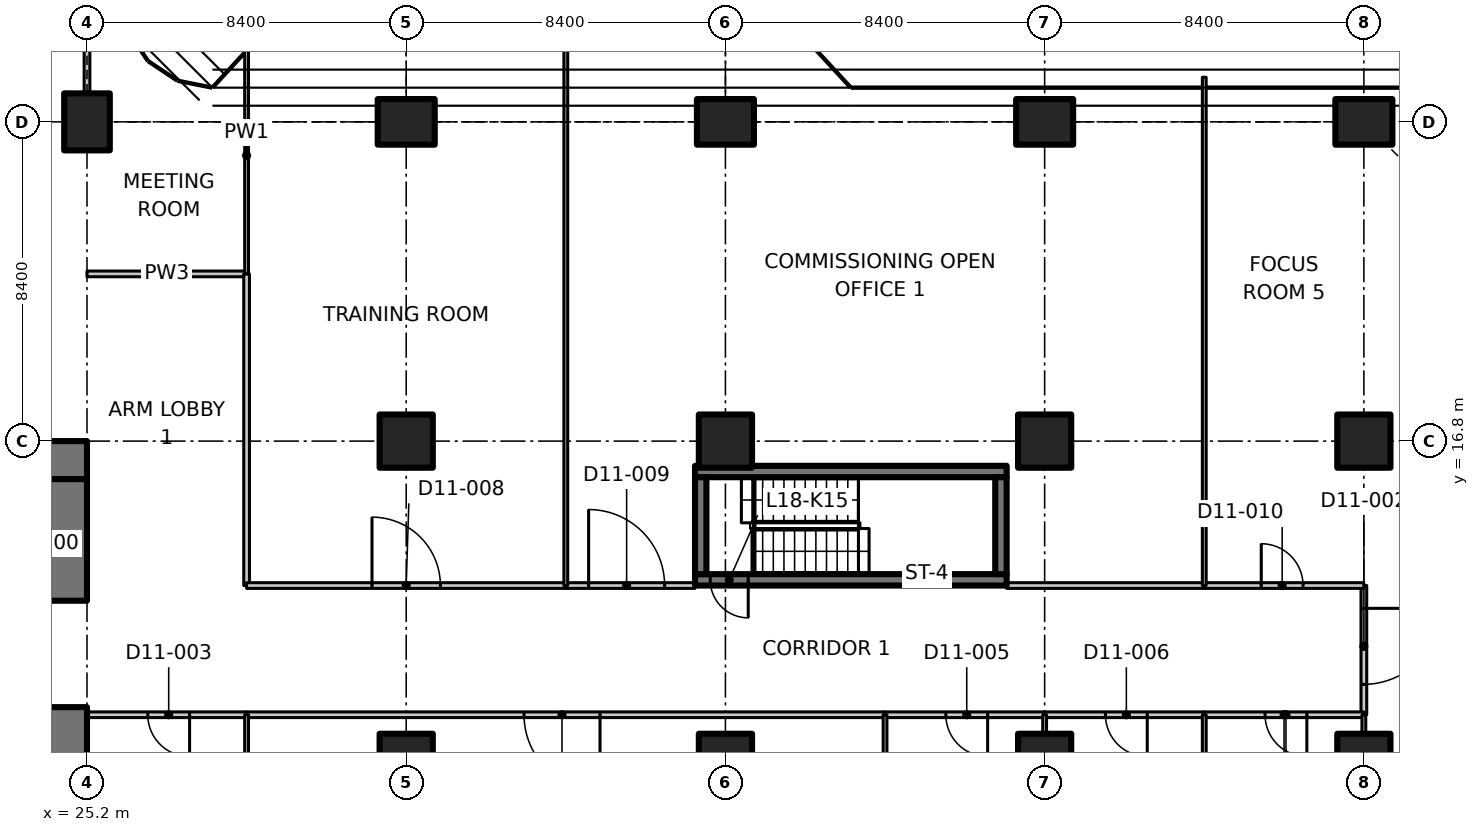
"""IFC4 building model, lengths in metres.
Left out: names, types, materials, properties, quantities, classifications, styles, units other than length and angle.
Written with IfcOpenShell. Run it as: python <this file> out.ifc"""

import sys

from ifc_helpers import new_model, si_unit, direction, frame, frame_2d, origin, origin_2d, place, context, subcontext, project, spatial, polyline, rectangle, outline, extrude, element, fill, save


model = new_model("IFC4")
c1 = context("Model", 3, precision=1e-05, world=origin(), true_north=direction((0.0, 1.0)))
c2 = subcontext(c1, "Body", "Model", "MODEL_VIEW")
j1 = project(units=[si_unit("LENGTHUNIT", "METRE"), si_unit("PLANEANGLEUNIT", "RADIAN")], contexts=[c1])
p1 = place(None, origin())
s1 = spatial("IfcSite", under=j1, at=p1, CompositionType="ELEMENT")
p2 = place(p1, origin())
s2 = spatial("IfcBuilding", under=s1, at=p2, CompositionType="ELEMENT")
p3 = place(p2, frame((0.0, 0.0, 79.7)))
s3 = spatial("IfcBuildingStorey", under=s2, at=p3, CompositionType="ELEMENT", Elevation=79.7)
p4 = place(p3, frame((25.2, 25.2, 0.0), z_axis=(0.0, 0.0, 1.0), x_axis=(1.0, 0.0, 0.0)))
e1 = element("IfcColumn", 1, at=p4, inside=s3, PredefinedType="COLUMN", context=c2, shape_type="SweptSolid", body=[
    extrude(rectangle(XDim=1.2, YDim=1.5, at=origin_2d()), origin(), (0.0, 0.0, 1.0), 3.35),
])
for number, where, z_axis, x_axis in (
    (2, (33.6, 8.4, 0.0), (0.0, 0.0, 1.0), (1.0, 0.0, 0.0)),
    (3, (33.6, 16.8, 0.0), (0.0, 0.0, 1.0), (1.0, 0.0, 0.0)),
):
    element("IfcColumn", number, at=place(p3, frame(where, z_axis=z_axis, x_axis=x_axis)), inside=s3, PredefinedType="COLUMN", context=c2, shape_type="SweptSolid", body=[
        extrude(rectangle(XDim=1.4, YDim=1.4, at=origin_2d()), origin(), (0.0, 0.0, 1.0), 3.35),
    ])
p5 = place(p3, frame((33.6, 25.2, 0.0), z_axis=(0.0, 0.0, 1.0), x_axis=(0.0, 1.0, 0.0)))
e4 = element("IfcColumn", 4, at=p5, inside=s3, PredefinedType="COLUMN", context=c2, shape_type="SweptSolid", body=[
    extrude(rectangle(XDim=1.2, YDim=1.5, at=origin_2d()), origin(), (0.0, 0.0, 1.0), 3.35),
])
for number, where, z_axis, x_axis in (
    (5, (42.0, 8.4, 0.0), (0.0, 0.0, 1.0), (1.0, 0.0, 0.0)),
    (6, (42.0, 16.8, 0.0), (0.0, 0.0, 1.0), (1.0, 0.0, 0.0)),
):
    element("IfcColumn", number, at=place(p3, frame(where, z_axis=z_axis, x_axis=x_axis)), inside=s3, PredefinedType="COLUMN", context=c2, shape_type="SweptSolid", body=[
        extrude(rectangle(XDim=1.4, YDim=1.4, at=origin_2d()), origin(), (0.0, 0.0, 1.0), 3.35),
    ])
p6 = place(p3, frame((42.0, 25.2, 0.0), z_axis=(0.0, 0.0, 1.0), x_axis=(0.0, 1.0, 0.0)))
e7 = element("IfcColumn", 7, at=p6, inside=s3, PredefinedType="COLUMN", context=c2, shape_type="SweptSolid", body=[
    extrude(rectangle(XDim=1.2, YDim=1.5, at=origin_2d()), origin(), (0.0, 0.0, 1.0), 3.35),
])
for number, where, z_axis, x_axis in (
    (8, (50.4, 8.4, 0.0), (0.0, 0.0, 1.0), (1.0, 0.0, 0.0)),
    (9, (50.4, 16.8, 0.0), (0.0, 0.0, 1.0), (1.0, 0.0, 0.0)),
):
    element("IfcColumn", number, at=place(p3, frame(where, z_axis=z_axis, x_axis=x_axis)), inside=s3, PredefinedType="COLUMN", context=c2, shape_type="SweptSolid", body=[
        extrude(rectangle(XDim=1.4, YDim=1.4, at=origin_2d()), origin(), (0.0, 0.0, 1.0), 3.35),
    ])
p7 = place(p3, frame((50.4, 25.2, 0.0), z_axis=(0.0, 0.0, 1.0), x_axis=(0.0, 1.0, 0.0)))
e10 = element("IfcColumn", 10, at=p7, inside=s3, PredefinedType="COLUMN", context=c2, shape_type="SweptSolid", body=[
    extrude(rectangle(XDim=1.2, YDim=1.5, at=origin_2d()), origin(), (0.0, 0.0, 1.0), 3.35),
])
for number, where, z_axis, x_axis in (
    (11, (58.8, 8.4, 0.0), (0.0, 0.0, 1.0), (1.0, 0.0, 0.0)),
    (12, (58.8, 16.8, 0.0), (0.0, 0.0, 1.0), (1.0, 0.0, 0.0)),
):
    element("IfcColumn", number, at=place(p3, frame(where, z_axis=z_axis, x_axis=x_axis)), inside=s3, PredefinedType="COLUMN", context=c2, shape_type="SweptSolid", body=[
        extrude(rectangle(XDim=1.4, YDim=1.4, at=origin_2d()), origin(), (0.0, 0.0, 1.0), 3.35),
    ])
p8 = place(p3, frame((58.8, 25.2, 0.0), z_axis=(0.0, 0.0, 1.0), x_axis=(0.0, 1.0, 0.0)))
e13 = element("IfcColumn", 13, at=p8, inside=s3, PredefinedType="COLUMN", context=c2, shape_type="SweptSolid", body=[
    extrude(rectangle(XDim=1.2, YDim=1.5, at=origin_2d()), origin(), (0.0, 0.0, 1.0), 3.35),
])
p9 = place(p3, frame((23.8, 16.3, 0.0), z_axis=(0.0, 0.0, 1.0), x_axis=(1.0, 0.0, 0.0)))
e14 = element("IfcWall", 14, at=p9, inside=s3, PredefinedType="SHEAR", context=c2, shape_type="SweptSolid", body=[
    extrude(rectangle(XDim=1.4, YDim=1.0, at=frame_2d((0.7, 0.0))), origin(), (0.0, 0.0, 1.0), 3.35),
])
p10 = place(p3, frame((24.7, 1.0, 0.0), z_axis=(0.0, 0.0, 1.0), x_axis=(0.0, 1.0, 0.0)))
e15 = element("IfcWall", 15, at=p10, inside=s3, PredefinedType="SHEAR", context=c2, shape_type="SweptSolid", body=[
    extrude(rectangle(XDim=8.8, YDim=1.0, at=frame_2d((4.4, 0.0))), origin(), (0.0, 0.0, 1.0), 3.35),
])
p11 = place(p3, frame((24.7, 12.6, 0.0), z_axis=(0.0, 0.0, 1.0), x_axis=(0.0, 1.0, 0.0)))
e16 = element("IfcWall", 16, at=p11, inside=s3, PredefinedType="SHEAR", context=c2, shape_type="SweptSolid", body=[
    extrude(rectangle(XDim=3.2, YDim=1.0, at=frame_2d((1.6, 0.0))), origin(), (0.0, 0.0, 1.0), 3.35),
])
p12 = place(p3, frame((49.4, 13.15, 0.0), z_axis=(0.0, 0.0, 1.0), x_axis=(-1.0, 0.0, 0.0)))
e17 = element("IfcWall", 17, at=p12, inside=s3, PredefinedType="SHEAR", context=c2, shape_type="SweptSolid", body=[
    extrude(rectangle(XDim=8.2, YDim=0.3, at=frame_2d((4.1, 0.0))), origin(), (0.0, 0.0, 1.0), 3.35),
])
p13 = place(p12, frame((6.8, 0.0, 0.0)))
e18 = element("IfcOpeningElement", 18, at=p13, cuts=e17, PredefinedType="OPENING", context=c2, shape_type="SweptSolid", body=[
    extrude(rectangle(XDim=1.0, YDim=2.1, at=frame_2d((0.5, 1.05))), frame((0.0, 0.16, 0.0), z_axis=(0.0, -1.0, 0.0), x_axis=(1.0, 0.0, 0.0)), (0.0, 0.0, 1.0), 0.32),
])
p14 = place(p3, frame((41.2, 16.0, 0.0), z_axis=(0.0, 0.0, 1.0), x_axis=(1.0, 0.0, 0.0)))
e19 = element("IfcWall", 19, at=p14, inside=s3, PredefinedType="SHEAR", context=c2, shape_type="SweptSolid", body=[
    extrude(rectangle(XDim=8.2, YDim=0.3, at=frame_2d((4.1, 0.0))), origin(), (0.0, 0.0, 1.0), 3.35),
])
for number, where, z_axis, x_axis in (
    (20, (41.35, 13.3, 0.0), (0.0, 0.0, 1.0), (0.0, 1.0, 0.0)),
    (21, (49.25, 13.3, 0.0), (0.0, 0.0, 1.0), (0.0, 1.0, 0.0)),
):
    element("IfcWall", number, at=place(p3, frame(where, z_axis=z_axis, x_axis=x_axis)), inside=s3, PredefinedType="SHEAR", context=c2, shape_type="SweptSolid", body=[
        extrude(rectangle(XDim=2.55, YDim=0.3, at=frame_2d((1.275, 0.0))), origin(), (0.0, 0.0, 1.0), 3.35),
    ])
p15 = place(p3, frame((25.2, 21.2, 0.0), z_axis=(0.0, 0.0, 1.0), x_axis=(1.0, 0.0, 0.0)))
e22 = element("IfcWall", 22, at=p15, inside=s3, PredefinedType="PARTITIONING", context=c2, shape_type="SweptSolid", body=[
    extrude(rectangle(XDim=4.2, YDim=0.15, at=frame_2d((2.1, 0.0))), origin(), (0.0, 0.0, 1.0), 3.33),
])
p16 = place(p3, frame((29.4, 9.6, 0.0), z_axis=(0.0, 0.0, 1.0), x_axis=(-1.0, 0.0, 0.0)))
e23 = element("IfcWall", 23, at=p16, inside=s3, PredefinedType="PARTITIONING", context=c2, shape_type="SweptSolid", body=[
    extrude(rectangle(XDim=4.2, YDim=0.15, at=frame_2d((2.1, 0.0))), origin(), (0.0, 0.0, 1.0), 3.33),
])
p17 = place(p16, frame((1.5, 0.0, 0.0)))
e24 = element("IfcOpeningElement", 24, at=p17, cuts=e23, PredefinedType="OPENING", context=c2, shape_type="SweptSolid", body=[
    extrude(rectangle(XDim=1.1, YDim=2.1, at=frame_2d((0.55, 1.05))), frame((0.0, 0.085, 0.0), z_axis=(0.0, -1.0, 0.0), x_axis=(1.0, 0.0, 0.0)), (0.0, 0.0, 1.0), 0.17),
])
p18 = place(p3, frame((29.4, 21.2, 0.0), z_axis=(0.0, 0.0, 1.0), x_axis=(0.0, -1.0, 0.0)))
e25 = element("IfcWall", 25, at=p18, inside=s3, PredefinedType="PARTITIONING", context=c2, shape_type="SweptSolid", body=[
    extrude(rectangle(XDim=8.2, YDim=0.15, at=frame_2d((4.1, 0.0))), origin(), (0.0, 0.0, 1.0), 3.33),
])
p19 = place(p3, frame((29.4, 27.429, 0.0), z_axis=(0.0, 0.0, 1.0), x_axis=(0.0, -1.0, 0.0)))
e26 = element("IfcWall", 26, at=p19, inside=s3, PredefinedType="PARTITIONING", context=c2, shape_type="SweptSolid", body=[
    extrude(outline(polyline([(0.0, 0.0), (6.229, 0.0), (6.229, 3.33), (2.679, 3.33), (2.677, 2.98), (1.781, 2.98), (1.779, 3.33), (0.154, 3.33), (0.0, 3.33), (0.0, 0.0)])), frame((0.0, 0.05, 0.0), z_axis=(0.0, -1.0, 0.0), x_axis=(1.0, 0.0, 0.0)), (0.0, 0.0, 1.0), 0.1),
])
p20 = place(p3, frame((25.2, 31.0, 0.0), z_axis=(0.0, 0.0, 1.0), x_axis=(0.0, -1.0, 0.0)))
e27 = element("IfcWall", 27, at=p20, inside=s3, PredefinedType="PARTITIONING", context=c2, shape_type="SweptSolid", body=[
    extrude(outline(polyline([(0.0, 0.0), (5.03, 0.0), (5.03, 2.98), (0.0, 2.98), (0.0, 0.0)])), frame((0.0, 0.075, 0.0), z_axis=(0.0, -1.0, 0.0), x_axis=(1.0, 0.0, 0.0)), (0.0, 0.0, 1.0), 0.15),
])
p21 = place(p20, frame((1.83, 0.0, 0.0)))
e28 = element("IfcOpeningElement", 28, at=p21, cuts=e27, PredefinedType="OPENING", context=c2, shape_type="SweptSolid", body=[
    extrude(rectangle(XDim=1.1, YDim=2.1, at=frame_2d((0.55, 1.05))), frame((0.0, 0.085, 0.0), z_axis=(0.0, -1.0, 0.0), x_axis=(1.0, 0.0, 0.0)), (0.0, 0.0, 1.0), 0.17),
])
p22 = place(p3, frame((58.8, 13.0, 0.0), z_axis=(0.0, 0.0, 1.0), x_axis=(0.0, -1.0, 0.0)))
e29 = element("IfcWall", 29, at=p22, inside=s3, PredefinedType="PARTITIONING", context=c2, shape_type="SweptSolid", body=[
    extrude(rectangle(XDim=3.4, YDim=0.15, at=frame_2d((1.7, 0.0))), origin(), (0.0, 0.0, 1.0), 3.33),
])
p23 = place(p22, frame((0.6, 0.0, 0.0)))
e30 = element("IfcOpeningElement", 30, at=p23, cuts=e29, PredefinedType="OPENING", context=c2, shape_type="SweptSolid", body=[
    extrude(rectangle(XDim=2.0, YDim=2.4, at=frame_2d((1.0, 1.2))), frame((0.0, 0.085, 0.0), z_axis=(0.0, -1.0, 0.0), x_axis=(1.0, 0.0, 0.0)), (0.0, 0.0, 1.0), 0.17),
])
p24 = place(p3, frame((46.2, 9.6, 0.0), z_axis=(0.0, 0.0, 1.0), x_axis=(-1.0, 0.0, 0.0)))
e31 = element("IfcWall", 31, at=p24, inside=s3, PredefinedType="PARTITIONING", context=c2, shape_type="SweptSolid", body=[
    extrude(rectangle(XDim=16.8, YDim=0.15, at=frame_2d((8.4, 0.0))), origin(), (0.0, 0.0, 1.0), 3.33),
])
p25 = place(p24, frame((7.5, 0.0, 0.0)))
e32 = element("IfcOpeningElement", 32, at=p25, cuts=e31, PredefinedType="OPENING", context=c2, shape_type="SweptSolid", body=[
    extrude(rectangle(XDim=2.0, YDim=2.4, at=frame_2d((1.0, 1.2))), frame((0.0, 0.085, 0.0), z_axis=(0.0, -1.0, 0.0), x_axis=(1.0, 0.0, 0.0)), (0.0, 0.0, 1.0), 0.17),
])
p26 = place(p3, frame((50.4, 9.6, 0.0), z_axis=(0.0, 0.0, 1.0), x_axis=(-1.0, 0.0, 0.0)))
e33 = element("IfcWall", 33, at=p26, inside=s3, PredefinedType="PARTITIONING", context=c2, shape_type="SweptSolid", body=[
    extrude(rectangle(XDim=4.2, YDim=0.15, at=frame_2d((2.1, 0.0))), origin(), (0.0, 0.0, 1.0), 3.33),
])
p27 = place(p26, frame((1.5, 0.0, 0.0)))
e34 = element("IfcOpeningElement", 34, at=p27, cuts=e33, PredefinedType="OPENING", context=c2, shape_type="SweptSolid", body=[
    extrude(rectangle(XDim=1.1, YDim=2.1, at=frame_2d((0.55, 1.05))), frame((0.0, 0.085, 0.0), z_axis=(0.0, -1.0, 0.0), x_axis=(1.0, 0.0, 0.0)), (0.0, 0.0, 1.0), 0.17),
])
p28 = place(p3, frame((54.6, 9.6, 0.0), z_axis=(0.0, 0.0, 1.0), x_axis=(-1.0, 0.0, 0.0)))
e35 = element("IfcWall", 35, at=p28, inside=s3, PredefinedType="PARTITIONING", context=c2, shape_type="SweptSolid", body=[
    extrude(rectangle(XDim=4.2, YDim=0.15, at=frame_2d((2.1, 0.0))), origin(), (0.0, 0.0, 1.0), 3.33),
])
p29 = place(p28, frame((1.5, 0.0, 0.0)))
e36 = element("IfcOpeningElement", 36, at=p29, cuts=e35, PredefinedType="OPENING", context=c2, shape_type="SweptSolid", body=[
    extrude(rectangle(XDim=1.1, YDim=2.1, at=frame_2d((0.55, 1.05))), frame((0.0, 0.085, 0.0), z_axis=(0.0, -1.0, 0.0), x_axis=(1.0, 0.0, 0.0)), (0.0, 0.0, 1.0), 0.17),
])
p30 = place(p3, frame((58.8, 9.6, 0.0), z_axis=(0.0, 0.0, 1.0), x_axis=(-1.0, 0.0, 0.0)))
e37 = element("IfcWall", 37, at=p30, inside=s3, PredefinedType="PARTITIONING", context=c2, shape_type="SweptSolid", body=[
    extrude(rectangle(XDim=4.2, YDim=0.15, at=frame_2d((2.1, 0.0))), origin(), (0.0, 0.0, 1.0), 3.33),
])
p31 = place(p30, frame((1.5, 0.0, 0.0)))
e38 = element("IfcOpeningElement", 38, at=p31, cuts=e37, PredefinedType="OPENING", context=c2, shape_type="SweptSolid", body=[
    extrude(rectangle(XDim=1.1, YDim=2.1, at=frame_2d((0.55, 1.05))), frame((0.0, 0.085, 0.0), z_axis=(0.0, -1.0, 0.0), x_axis=(1.0, 0.0, 0.0)), (0.0, 0.0, 1.0), 0.17),
])
p32 = place(p3, frame((29.4, 13.0, 0.0), z_axis=(0.0, 0.0, 1.0), x_axis=(1.0, 0.0, 0.0)))
e39 = element("IfcWall", 39, at=p32, inside=s3, PredefinedType="PARTITIONING", context=c2, shape_type="SweptSolid", body=[
    extrude(rectangle(XDim=8.4, YDim=0.15, at=frame_2d((4.2, 0.0))), origin(), (0.0, 0.0, 1.0), 3.33),
])
p33 = place(p32, frame((3.3, 0.0, 0.0)))
e40 = element("IfcOpeningElement", 40, at=p33, cuts=e39, PredefinedType="OPENING", context=c2, shape_type="SweptSolid", body=[
    extrude(rectangle(XDim=1.8, YDim=2.1, at=frame_2d((0.9, 1.05))), frame((0.0, 0.085, 0.0), z_axis=(0.0, -1.0, 0.0), x_axis=(1.0, 0.0, 0.0)), (0.0, 0.0, 1.0), 0.17),
])
p34 = place(p3, frame((37.8, 13.0, 0.0), z_axis=(0.0, 0.0, 1.0), x_axis=(1.0, 0.0, 0.0)))
e41 = element("IfcWall", 41, at=p34, inside=s3, PredefinedType="PARTITIONING", context=c2, shape_type="SweptSolid", body=[
    extrude(rectangle(XDim=3.4, YDim=0.15, at=frame_2d((1.7, 0.0))), origin(), (0.0, 0.0, 1.0), 3.33),
])
p35 = place(p34, frame((0.6, 0.0, 0.0)))
e42 = element("IfcOpeningElement", 42, at=p35, cuts=e41, PredefinedType="OPENING", context=c2, shape_type="SweptSolid", body=[
    extrude(rectangle(XDim=2.0, YDim=2.4, at=frame_2d((1.0, 1.2))), frame((0.0, 0.085, 0.0), z_axis=(0.0, -1.0, 0.0), x_axis=(1.0, 0.0, 0.0)), (0.0, 0.0, 1.0), 0.17),
])
p36 = place(p3, frame((49.4, 13.0, 0.0), z_axis=(0.0, 0.0, 1.0), x_axis=(1.0, 0.0, 0.0)))
e43 = element("IfcWall", 43, at=p36, inside=s3, PredefinedType="PARTITIONING", context=c2, shape_type="SweptSolid", body=[
    extrude(rectangle(XDim=5.2, YDim=0.15, at=frame_2d((2.6, 0.0))), origin(), (0.0, 0.0, 1.0), 3.33),
])
p37 = place(p3, frame((54.6, 13.0, 0.0), z_axis=(0.0, 0.0, 1.0), x_axis=(1.0, 0.0, 0.0)))
e44 = element("IfcWall", 44, at=p37, inside=s3, PredefinedType="PARTITIONING", context=c2, shape_type="SweptSolid", body=[
    extrude(rectangle(XDim=4.2, YDim=0.15, at=frame_2d((2.1, 0.0))), origin(), (0.0, 0.0, 1.0), 3.33),
])
p38 = place(p37, frame((1.5, 0.0, 0.0)))
e45 = element("IfcOpeningElement", 45, at=p38, cuts=e44, PredefinedType="OPENING", context=c2, shape_type="SweptSolid", body=[
    extrude(rectangle(XDim=1.1, YDim=2.1, at=frame_2d((0.55, 1.05))), frame((0.0, 0.085, 0.0), z_axis=(0.0, -1.0, 0.0), x_axis=(1.0, 0.0, 0.0)), (0.0, 0.0, 1.0), 0.17),
])
p39 = place(p3, frame((58.8, 9.12, 0.0), z_axis=(0.0, 0.0, 1.0), x_axis=(0.0, 1.0, 0.0)))
e46 = element("IfcWall", 46, at=p39, inside=s3, PredefinedType="PARTITIONING", context=c2, shape_type="SweptSolid", body=[
    extrude(rectangle(XDim=0.48, YDim=0.1, at=frame_2d((0.24, 0.0))), origin(), (0.0, 0.0, 1.0), 3.33),
])
for number, where, z_axis, x_axis in (
    (47, (29.4, 9.6, 0.0), (0.0, 0.0, 1.0), (0.0, -1.0, 0.0)),
    (48, (46.2, 9.6, 0.0), (0.0, 0.0, 1.0), (0.0, -1.0, 0.0)),
):
    element("IfcWall", number, at=place(p3, frame(where, z_axis=z_axis, x_axis=x_axis)), inside=s3, PredefinedType="PARTITIONING", context=c2, shape_type="SweptSolid", body=[
        extrude(outline(polyline([(0.0, 0.0), (10.965, 0.0), (10.965, 3.33), (10.7, 3.33), (10.05, 3.33), (10.048, 2.98), (9.152, 2.98), (9.15, 3.33), (0.0, 3.33), (0.0, 0.0)])), frame((0.0, 0.05, 0.0), z_axis=(0.0, -1.0, 0.0), x_axis=(1.0, 0.0, 0.0)), (0.0, 0.0, 1.0), 0.1),
    ])
p40 = place(p3, frame((50.4, 9.6, 0.0), z_axis=(0.0, 0.0, 1.0), x_axis=(0.0, -1.0, 0.0)))
e49 = element("IfcWall", 49, at=p40, inside=s3, PredefinedType="PARTITIONING", context=c2, shape_type="SweptSolid", body=[
    extrude(rectangle(XDim=0.48, YDim=0.1, at=frame_2d((0.24, 0.0))), origin(), (0.0, 0.0, 1.0), 3.33),
])
p41 = place(p3, frame((54.6, 9.6, 0.0), z_axis=(0.0, 0.0, 1.0), x_axis=(0.0, -1.0, 0.0)))
e50 = element("IfcWall", 50, at=p41, inside=s3, PredefinedType="PARTITIONING", context=c2, shape_type="SweptSolid", body=[
    extrude(outline(polyline([(0.0, 0.0), (10.965, 0.0), (10.965, 3.33), (10.7, 3.33), (10.05, 3.33), (10.048, 2.98), (9.152, 2.98), (9.15, 3.33), (0.0, 3.33), (0.0, 0.0)])), frame((0.0, 0.05, 0.0), z_axis=(0.0, -1.0, 0.0), x_axis=(1.0, 0.0, 0.0)), (0.0, 0.0, 1.0), 0.1),
])
p42 = place(p3, frame((37.8, 30.243, 0.0), z_axis=(0.0, 0.0, 1.0), x_axis=(0.0, -1.0, 0.0)))
e51 = element("IfcWall", 51, at=p42, inside=s3, PredefinedType="PARTITIONING", context=c2, shape_type="SweptSolid", body=[
    extrude(outline(polyline([(0.0, 0.0), (17.243, 0.0), (17.243, 3.33), (5.493, 3.33), (5.491, 2.98), (4.595, 2.98), (4.593, 3.33), (0.0, 3.33), (0.0, 0.0)])), frame((0.0, 0.05, 0.0), z_axis=(0.0, -1.0, 0.0), x_axis=(1.0, 0.0, 0.0)), (0.0, 0.0, 1.0), 0.1),
])
p43 = place(p3, frame((54.6, 26.374, 0.0), z_axis=(0.0, 0.0, 1.0), x_axis=(0.0, -1.0, 0.0)))
e52 = element("IfcWall", 52, at=p43, inside=s3, PredefinedType="PARTITIONING", context=c2, shape_type="SweptSolid", body=[
    extrude(outline(polyline([(0.0, 0.0), (13.374, 0.0), (13.374, 3.33), (1.624, 3.33), (1.622, 2.98), (0.726, 2.98), (0.724, 3.33), (0.074, 3.33), (0.0, 3.33), (0.0, 0.0)])), frame((0.0, 0.05, 0.0), z_axis=(0.0, -1.0, 0.0), x_axis=(1.0, 0.0, 0.0)), (0.0, 0.0, 1.0), 0.1),
])
p44 = place(p13, origin())
e53 = element("IfcDoor", 53, at=p44, inside=s3, OperationType="SINGLE_SWING_LEFT", PredefinedType="DOOR", context=c2, shape_type="SweptSolid", body=[
    extrude(rectangle(XDim=1.0, YDim=2.1, at=frame_2d((0.5, 1.05))), frame((0.0, 0.025, 0.0), z_axis=(0.0, -1.0, 0.0), x_axis=(1.0, 0.0, 0.0)), (0.0, 0.0, 1.0), 0.05),
])
fill(e18, e53)
p45 = place(p23, origin())
e54 = element("IfcDoor", 54, at=p45, inside=s3, OperationType="DOUBLE_DOOR_SINGLE_SWING", PredefinedType="DOOR", context=c2, shape_type="SweptSolid", body=[
    extrude(rectangle(XDim=2.0, YDim=2.4, at=frame_2d((1.0, 1.2))), frame((0.0, 0.025, 0.0), z_axis=(0.0, -1.0, 0.0), x_axis=(1.0, 0.0, 0.0)), (0.0, 0.0, 1.0), 0.05),
])
fill(e30, e54)
p46 = place(p17, origin())
e55 = element("IfcDoor", 55, at=p46, inside=s3, OperationType="SINGLE_SWING_LEFT", PredefinedType="DOOR", context=c2, shape_type="SweptSolid", body=[
    extrude(rectangle(XDim=1.1, YDim=2.1, at=frame_2d((0.55, 1.05))), frame((0.0, 0.025, 0.0), z_axis=(0.0, -1.0, 0.0), x_axis=(1.0, 0.0, 0.0)), (0.0, 0.0, 1.0), 0.05),
])
fill(e24, e55)
p47 = place(p25, origin())
e56 = element("IfcDoor", 56, at=p47, inside=s3, OperationType="DOUBLE_DOOR_SINGLE_SWING", PredefinedType="DOOR", context=c2, shape_type="SweptSolid", body=[
    extrude(rectangle(XDim=2.0, YDim=2.4, at=frame_2d((1.0, 1.2))), frame((0.0, 0.025, 0.0), z_axis=(0.0, -1.0, 0.0), x_axis=(1.0, 0.0, 0.0)), (0.0, 0.0, 1.0), 0.05),
])
fill(e32, e56)
p48 = place(p27, origin())
e57 = element("IfcDoor", 57, at=p48, inside=s3, OperationType="SINGLE_SWING_LEFT", PredefinedType="DOOR", context=c2, shape_type="SweptSolid", body=[
    extrude(rectangle(XDim=1.1, YDim=2.1, at=frame_2d((0.55, 1.05))), frame((0.0, 0.025, 0.0), z_axis=(0.0, -1.0, 0.0), x_axis=(1.0, 0.0, 0.0)), (0.0, 0.0, 1.0), 0.05),
])
fill(e34, e57)
p49 = place(p29, origin())
e58 = element("IfcDoor", 58, at=p49, inside=s3, OperationType="SINGLE_SWING_LEFT", PredefinedType="DOOR", context=c2, shape_type="SweptSolid", body=[
    extrude(rectangle(XDim=1.1, YDim=2.1, at=frame_2d((0.55, 1.05))), frame((0.0, 0.025, 0.0), z_axis=(0.0, -1.0, 0.0), x_axis=(1.0, 0.0, 0.0)), (0.0, 0.0, 1.0), 0.05),
])
fill(e36, e58)
p50 = place(p31, origin())
e59 = element("IfcDoor", 59, at=p50, inside=s3, OperationType="SINGLE_SWING_LEFT", PredefinedType="DOOR", context=c2, shape_type="SweptSolid", body=[
    extrude(rectangle(XDim=1.1, YDim=2.1, at=frame_2d((0.55, 1.05))), frame((0.0, 0.025, 0.0), z_axis=(0.0, -1.0, 0.0), x_axis=(1.0, 0.0, 0.0)), (0.0, 0.0, 1.0), 0.05),
])
fill(e38, e59)
p51 = place(p33, origin())
e60 = element("IfcDoor", 60, at=p51, inside=s3, OperationType="DOUBLE_DOOR_SINGLE_SWING", PredefinedType="DOOR", context=c2, shape_type="SweptSolid", body=[
    extrude(rectangle(XDim=1.8, YDim=2.1, at=frame_2d((0.9, 1.05))), frame((0.0, 0.025, 0.0), z_axis=(0.0, -1.0, 0.0), x_axis=(1.0, 0.0, 0.0)), (0.0, 0.0, 1.0), 0.05),
])
fill(e40, e60)
p52 = place(p35, origin())
e61 = element("IfcDoor", 61, at=p52, inside=s3, OperationType="DOUBLE_DOOR_SINGLE_SWING", PredefinedType="DOOR", context=c2, shape_type="SweptSolid", body=[
    extrude(rectangle(XDim=2.0, YDim=2.4, at=frame_2d((1.0, 1.2))), frame((0.0, 0.025, 0.0), z_axis=(0.0, -1.0, 0.0), x_axis=(1.0, 0.0, 0.0)), (0.0, 0.0, 1.0), 0.05),
])
fill(e42, e61)
p53 = place(p38, origin())
e62 = element("IfcDoor", 62, at=p53, inside=s3, OperationType="SINGLE_SWING_LEFT", PredefinedType="DOOR", context=c2, shape_type="SweptSolid", body=[
    extrude(rectangle(XDim=1.1, YDim=2.1, at=frame_2d((0.55, 1.05))), frame((0.0, 0.025, 0.0), z_axis=(0.0, -1.0, 0.0), x_axis=(1.0, 0.0, 0.0)), (0.0, 0.0, 1.0), 0.05),
])
fill(e45, e62)
save(model, sys.argv[1])
